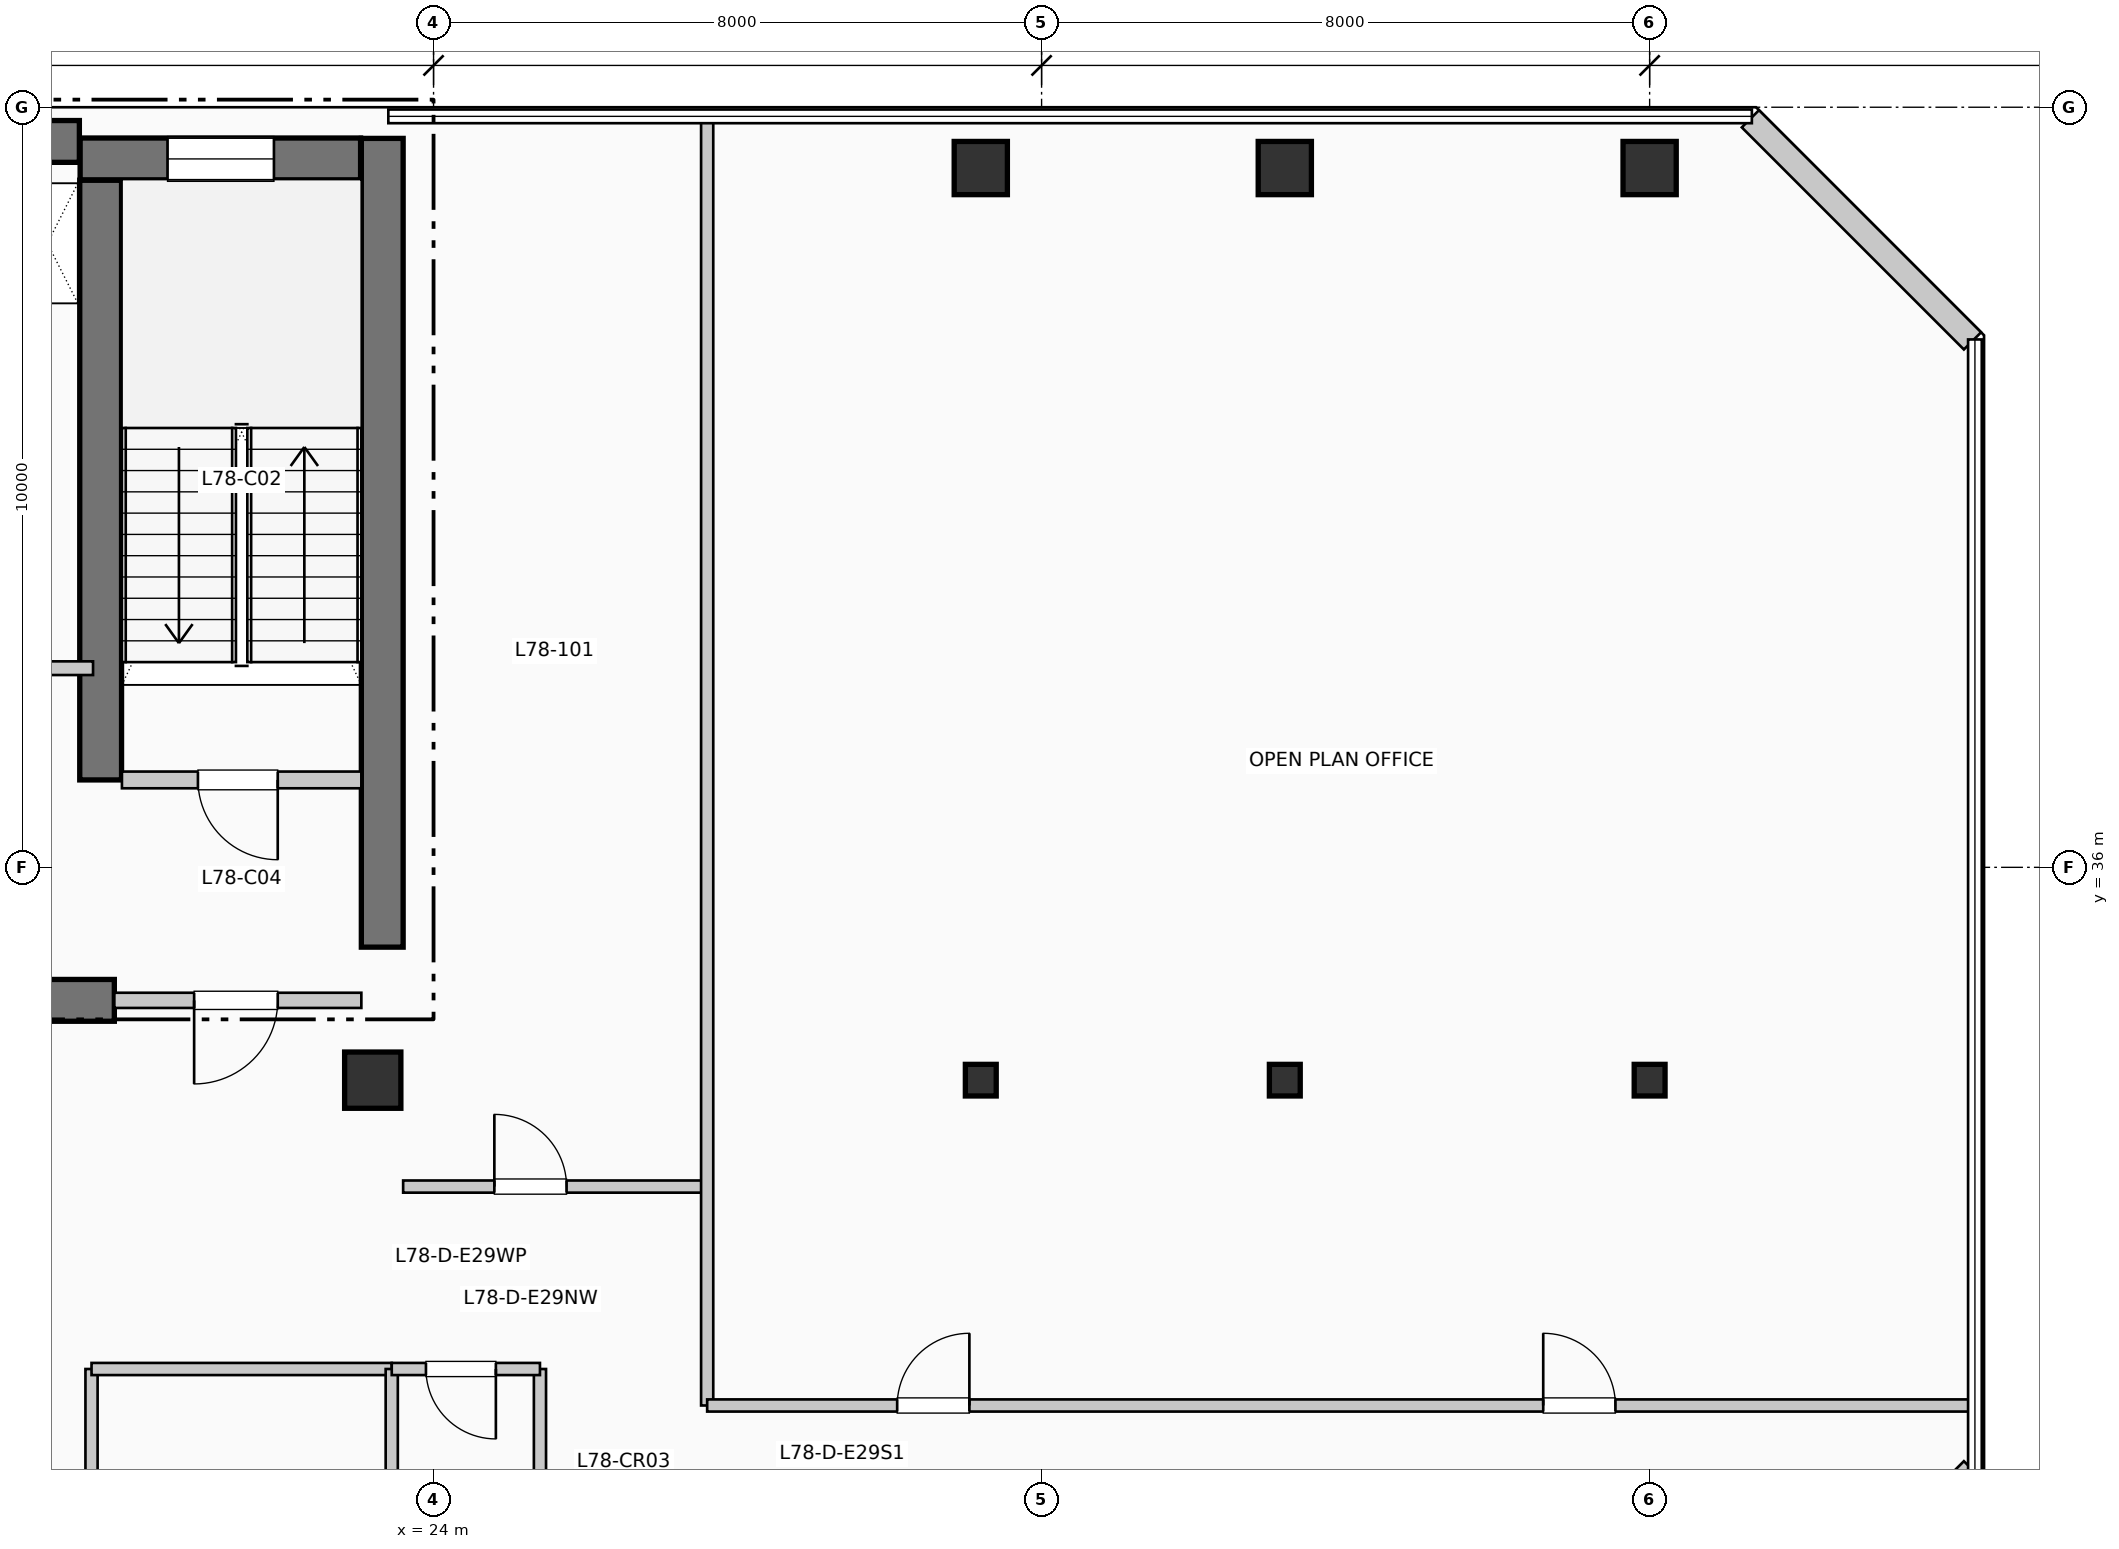
"""IFC4 building model, lengths in metres.
Left out: names, types, materials, properties, quantities, classifications, styles, units other than length and angle.
Written with IfcOpenShell. Run it as: python <this file> out.ifc"""

import sys

from ifc_helpers import new_model, si_unit, direction, frame, frame_2d, origin, origin_2d, place, context, subcontext, project, spatial, rectangle, i_section, extrude, element, fill, save


model = new_model("IFC4")
c1 = context("Model", 3, precision=1e-05, world=origin(), true_north=direction((0.0, 1.0)))
c2 = subcontext(c1, "Body", "Model", "MODEL_VIEW")
j1 = project(units=[si_unit("LENGTHUNIT", "METRE"), si_unit("PLANEANGLEUNIT", "RADIAN")], contexts=[c1])
p1 = place(None, origin())
s1 = spatial("IfcSite", under=j1, at=p1, CompositionType="ELEMENT")
p2 = place(p1, origin())
s2 = spatial("IfcBuilding", under=s1, at=p2, CompositionType="ELEMENT")
p3 = place(p2, frame((0.0, 0.0, 319.77)))
s3 = spatial("IfcBuildingStorey", under=s2, at=p3, CompositionType="ELEMENT", Elevation=319.77)
p4 = place(p3, frame((5.36, 45.55, 0.0), z_axis=(0.0, 0.0, 1.0), x_axis=(1.0, 0.0, 0.0)))
e1 = element("IfcWall", 1, at=p4, inside=s3, PredefinedType="SHEAR", context=c2, shape_type="SweptSolid", body=[
    extrude(rectangle(XDim=13.98, YDim=0.55, at=frame_2d((6.99, 0.0))), origin(), (0.0, 0.0, 1.0), 3.96),
])
p5 = place(p3, frame((23.325, 34.95, 0.0), z_axis=(0.0, 0.0, 1.0), x_axis=(0.0, 1.0, 0.0)))
e2 = element("IfcWall", 2, at=p5, inside=s3, PredefinedType="SHEAR", context=c2, shape_type="SweptSolid", body=[
    extrude(rectangle(XDim=10.64, YDim=0.55, at=frame_2d((5.32, 0.0))), origin(), (0.0, 0.0, 1.0), 3.96),
])
p6 = place(p3, frame((13.68, 34.25, 0.0), z_axis=(0.0, 0.0, 1.0), x_axis=(1.0, 0.0, 0.0)))
e3 = element("IfcWall", 3, at=p6, inside=s3, PredefinedType="SHEAR", context=c2, shape_type="SweptSolid", body=[
    extrude(rectangle(XDim=6.12, YDim=0.55, at=frame_2d((3.06, 0.0))), origin(), (0.0, 0.0, 1.0), 3.96),
])
p7 = place(p3, frame((19.62, 37.15, 0.0), z_axis=(0.0, 0.0, 1.0), x_axis=(0.0, 1.0, 0.0)))
e4 = element("IfcWall", 4, at=p7, inside=s3, PredefinedType="SHEAR", context=c2, shape_type="SweptSolid", body=[
    extrude(rectangle(XDim=7.89, YDim=0.55, at=frame_2d((3.945, 0.0))), origin(), (0.0, 0.0, 1.0), 3.96),
])
p8 = place(p3, frame((19.35, 45.32, 0.0), z_axis=(0.0, 0.0, 1.0), x_axis=(1.0, 0.0, 0.0)))
e5 = element("IfcWall", 5, at=p8, inside=s3, PredefinedType="SHEAR", context=c2, shape_type="SweptSolid", body=[
    extrude(rectangle(XDim=3.69, YDim=0.55, at=frame_2d((1.845, 0.0))), origin(), (0.0, 0.0, 1.0), 3.96),
])
p9 = place(p8, frame((1.15, 0.0, 1.05)))
e6 = element("IfcOpeningElement", 6, at=p9, cuts=e5, PredefinedType="OPENING", context=c2, shape_type="SweptSolid", body=[
    extrude(rectangle(XDim=1.4, YDim=1.8, at=frame_2d((0.7, 0.9))), frame((0.0, 0.285, 0.0), z_axis=(0.0, -1.0, 0.0), x_axis=(1.0, 0.0, 0.0)), (0.0, 0.0, 1.0), 0.57),
])
p10 = place(p3, frame((23.2, 33.2, 0.0), z_axis=(0.0, 0.0, 1.0), x_axis=(1.0, 0.0, 0.0)))
e7 = element("IfcColumn", 7, at=p10, inside=s3, PredefinedType="COLUMN", context=c2, shape_type="SweptSolid", body=[
    extrude(rectangle(XDim=0.74, YDim=0.74, at=origin_2d()), origin(), (0.0, 0.0, 1.0), 3.96),
])
p11 = place(p3, frame((31.2, 33.2, 0.0), z_axis=(0.0, 0.0, 1.0), x_axis=(1.0, 0.0, 0.0)))
e8 = element("IfcColumn", 8, at=p11, inside=s3, PredefinedType="COLUMN", context=c2, shape_type="SweptSolid", body=[
    extrude(i_section(OverallWidth=0.406, OverallDepth=0.416, WebThickness=0.022, FlangeThickness=0.036, at=origin_2d()), origin(), (0.0, 0.0, 1.0), 3.96),
])
p12 = place(p3, frame((31.2, 45.2, 0.0), z_axis=(0.0, 0.0, 1.0), x_axis=(1.0, 0.0, 0.0)))
e9 = element("IfcColumn", 9, at=p12, inside=s3, PredefinedType="COLUMN", context=c2, shape_type="SweptSolid", body=[
    extrude(rectangle(XDim=0.7, YDim=0.7, at=origin_2d()), origin(), (0.0, 0.0, 1.0), 3.96),
])
p13 = place(p3, frame((35.2, 33.2, 0.0), z_axis=(0.0, 0.0, 1.0), x_axis=(1.0, 0.0, 0.0)))
e10 = element("IfcColumn", 10, at=p13, inside=s3, PredefinedType="COLUMN", context=c2, shape_type="SweptSolid", body=[
    extrude(i_section(OverallWidth=0.406, OverallDepth=0.416, WebThickness=0.022, FlangeThickness=0.036, at=origin_2d()), origin(), (0.0, 0.0, 1.0), 3.96),
])
p14 = place(p3, frame((35.2, 45.2, 0.0), z_axis=(0.0, 0.0, 1.0), x_axis=(1.0, 0.0, 0.0)))
e11 = element("IfcColumn", 11, at=p14, inside=s3, PredefinedType="COLUMN", context=c2, shape_type="SweptSolid", body=[
    extrude(rectangle(XDim=0.7, YDim=0.7, at=origin_2d()), origin(), (0.0, 0.0, 1.0), 3.96),
])
p15 = place(p3, frame((40.0, 33.2, 0.0), z_axis=(0.0, 0.0, 1.0), x_axis=(1.0, 0.0, 0.0)))
e12 = element("IfcColumn", 12, at=p15, inside=s3, PredefinedType="COLUMN", context=c2, shape_type="SweptSolid", body=[
    extrude(i_section(OverallWidth=0.406, OverallDepth=0.416, WebThickness=0.022, FlangeThickness=0.036, at=origin_2d()), origin(), (0.0, 0.0, 1.0), 3.96),
])
p16 = place(p3, frame((40.0, 45.2, 0.0), z_axis=(0.0, 0.0, 1.0), x_axis=(1.0, 0.0, 0.0)))
e13 = element("IfcColumn", 13, at=p16, inside=s3, PredefinedType="COLUMN", context=c2, shape_type="SweptSolid", body=[
    extrude(rectangle(XDim=0.7, YDim=0.7, at=origin_2d()), origin(), (0.0, 0.0, 1.0), 3.96),
])
for number, where, z_axis, x_axis in (
    (14, (41.326, 25.152, 0.0), (0.0, 0.0, 1.0), (0.707, 0.707, 0.0)),
    (15, (44.248, 42.926, 0.0), (0.0, 0.0, 1.0), (-0.707, 0.707, 0.0)),
):
    element("IfcWall", number, at=place(p3, frame(where, z_axis=z_axis, x_axis=x_axis)), inside=s3, PredefinedType="SOLIDWALL", context=c2, shape_type="SweptSolid", body=[
        extrude(rectangle(XDim=4.133, YDim=0.32, at=frame_2d((2.066, 0.0))), origin(), (0.0, 0.0, 1.0), 3.74),
    ])
p17 = place(p3, frame((19.9, 37.15, 0.0), z_axis=(0.0, 0.0, 1.0), x_axis=(1.0, 0.0, 0.0)))
e16 = element("IfcWall", 16, at=p17, inside=s3, PredefinedType="PARTITIONING", context=c2, shape_type="SweptSolid", body=[
    extrude(rectangle(XDim=3.15, YDim=0.22, at=frame_2d((1.575, 0.0))), origin(), (0.0, 0.0, 1.0), 3.74),
])
p18 = place(p17, frame((2.05, 0.0, 0.0), z_axis=(0.0, 0.0, 1.0), x_axis=(-1.0, 0.0, 0.0)))
e17 = element("IfcOpeningElement", 17, at=p18, cuts=e16, PredefinedType="OPENING", context=c2, shape_type="SweptSolid", body=[
    extrude(rectangle(XDim=1.05, YDim=2.15, at=frame_2d((0.525, 1.075))), frame((0.0, 0.12, 0.0), z_axis=(0.0, -1.0, 0.0), x_axis=(1.0, 0.0, 0.0)), (0.0, 0.0, 1.0), 0.24),
])
p19 = place(p3, frame((19.8, 34.25, 0.0), z_axis=(0.0, 0.0, 1.0), x_axis=(1.0, 0.0, 0.0)))
e18 = element("IfcWall", 18, at=p19, inside=s3, PredefinedType="PARTITIONING", context=c2, shape_type="SweptSolid", body=[
    extrude(rectangle(XDim=3.25, YDim=0.2, at=frame_2d((1.625, 0.0))), origin(), (0.0, 0.0, 1.0), 3.74),
])
p20 = place(p19, frame((2.15, 0.0, 0.0), z_axis=(0.0, 0.0, 1.0), x_axis=(-1.0, 0.0, 0.0)))
e19 = element("IfcOpeningElement", 19, at=p20, cuts=e18, PredefinedType="OPENING", context=c2, shape_type="SweptSolid", body=[
    extrude(rectangle(XDim=1.1, YDim=2.15, at=frame_2d((0.55, 1.075))), frame((0.0, 0.11, 0.0), z_axis=(0.0, -1.0, 0.0), x_axis=(1.0, 0.0, 0.0)), (0.0, 0.0, 1.0), 0.22),
])
p21 = place(p3, frame((17.68, 38.62, 0.0), z_axis=(0.0, 0.0, 1.0), x_axis=(1.0, 0.0, 0.0)))
e20 = element("IfcWall", 20, at=p21, inside=s3, PredefinedType="PARTITIONING", context=c2, shape_type="SweptSolid", body=[
    extrude(rectangle(XDim=1.84, YDim=0.18, at=frame_2d((0.92, 0.0))), origin(), (0.0, 0.0, 1.0), 3.74),
])
p22 = place(p21, frame((0.24, 0.0, 0.0)))
e21 = element("IfcOpeningElement", 21, at=p22, cuts=e20, PredefinedType="OPENING", context=c2, shape_type="SweptSolid", body=[
    extrude(rectangle(XDim=0.92, YDim=2.1, at=frame_2d((0.46, 1.05))), frame((0.0, 0.1, 0.0), z_axis=(0.0, -1.0, 0.0), x_axis=(1.0, 0.0, 0.0)), (0.0, 0.0, 1.0), 0.2),
])
p23 = place(p3, frame((19.5, 21.0, 0.0), z_axis=(0.0, 0.0, 1.0), x_axis=(0.0, 1.0, 0.0)))
e22 = element("IfcWall", 22, at=p23, inside=s3, PredefinedType="PARTITIONING", context=c2, shape_type="SweptSolid", body=[
    extrude(rectangle(XDim=8.4, YDim=0.16, at=frame_2d((4.2, 0.0))), origin(), (0.0, 0.0, 1.0), 3.74),
])
p24 = place(p23, frame((3.725, 0.0, 0.0)))
e23 = element("IfcOpeningElement", 23, at=p24, cuts=e22, PredefinedType="OPENING", context=c2, shape_type="SweptSolid", body=[
    extrude(rectangle(XDim=0.95, YDim=2.15, at=frame_2d((0.475, 1.075))), frame((0.0, 0.09, 0.0), z_axis=(0.0, -1.0, 0.0), x_axis=(1.0, 0.0, 0.0)), (0.0, 0.0, 1.0), 0.18),
])
p25 = place(p3, frame((19.5, 29.4, 0.0), z_axis=(0.0, 0.0, 1.0), x_axis=(1.0, 0.0, 0.0)))
e24 = element("IfcWall", 24, at=p25, inside=s3, PredefinedType="PARTITIONING", context=c2, shape_type="SweptSolid", body=[
    extrude(rectangle(XDim=3.95, YDim=0.16, at=frame_2d((1.975, 0.0))), origin(), (0.0, 0.0, 1.0), 3.425),
])
p26 = place(p3, frame((23.45, 5.99, 0.0), z_axis=(0.0, 0.0, 1.0), x_axis=(0.0, 1.0, 0.0)))
e25 = element("IfcWall", 25, at=p26, inside=s3, PredefinedType="PARTITIONING", context=c2, shape_type="SweptSolid", body=[
    extrude(rectangle(XDim=23.41, YDim=0.16, at=frame_2d((11.705, 0.0))), origin(), (0.0, 0.0, 1.0), 3.175),
])
p27 = place(p3, frame((25.4, 25.19, 0.0), z_axis=(0.0, 0.0, 1.0), x_axis=(0.0, 1.0, 0.0)))
e26 = element("IfcWall", 26, at=p27, inside=s3, PredefinedType="PARTITIONING", context=c2, shape_type="SweptSolid", body=[
    extrude(rectangle(XDim=4.21, YDim=0.16, at=frame_2d((2.105, 0.0))), origin(), (0.0, 0.0, 1.0), 3.74),
])
p28 = place(p3, frame((23.6, 31.8, 0.0), z_axis=(0.0, 0.0, 1.0), x_axis=(1.0, 0.0, 0.0)))
e27 = element("IfcWall", 27, at=p28, inside=s3, PredefinedType="PARTITIONING", context=c2, shape_type="SweptSolid", body=[
    extrude(rectangle(XDim=4.0, YDim=0.16, at=frame_2d((2.0, 0.0))), origin(), (0.0, 0.0, 1.0), 3.74),
])
p29 = place(p28, frame((1.2, 0.0, 0.0)))
e28 = element("IfcOpeningElement", 28, at=p29, cuts=e27, PredefinedType="OPENING", context=c2, shape_type="SweptSolid", body=[
    extrude(rectangle(XDim=0.95, YDim=2.15, at=frame_2d((0.475, 1.075))), frame((0.0, 0.09, 0.0), z_axis=(0.0, -1.0, 0.0), x_axis=(1.0, 0.0, 0.0)), (0.0, 0.0, 1.0), 0.18),
])
p30 = place(p3, frame((27.6, 28.92, 0.0), z_axis=(0.0, 0.0, 1.0), x_axis=(0.0, 1.0, 0.0)))
e29 = element("IfcWall", 29, at=p30, inside=s3, PredefinedType="PARTITIONING", context=c2, shape_type="SweptSolid", body=[
    extrude(rectangle(XDim=16.89, YDim=0.16, at=frame_2d((8.445, 0.0))), origin(), (0.0, 0.0, 1.0), 3.74),
])
p31 = place(p3, frame((27.6, 28.92, 0.0), z_axis=(0.0, 0.0, 1.0), x_axis=(1.0, 0.0, 0.0)))
e30 = element("IfcWall", 30, at=p31, inside=s3, PredefinedType="PARTITIONING", context=c2, shape_type="SweptSolid", body=[
    extrude(rectangle(XDim=16.61, YDim=0.16, at=frame_2d((8.305, 0.0))), origin(), (0.0, 0.0, 1.0), 3.74),
])
p32 = place(p31, frame((2.5, 0.0, 0.0)))
e31 = element("IfcOpeningElement", 31, at=p32, cuts=e30, PredefinedType="OPENING", context=c2, shape_type="SweptSolid", body=[
    extrude(rectangle(XDim=0.95, YDim=2.15, at=frame_2d((0.475, 1.075))), frame((0.0, 0.09, 0.0), z_axis=(0.0, -1.0, 0.0), x_axis=(1.0, 0.0, 0.0)), (0.0, 0.0, 1.0), 0.18),
])
p33 = place(p31, frame((11.0, 0.0, 0.0)))
e32 = element("IfcOpeningElement", 32, at=p33, cuts=e30, PredefinedType="OPENING", context=c2, shape_type="SweptSolid", body=[
    extrude(rectangle(XDim=0.95, YDim=2.15, at=frame_2d((0.475, 1.075))), frame((0.0, 0.09, 0.0), z_axis=(0.0, -1.0, 0.0), x_axis=(1.0, 0.0, 0.0)), (0.0, 0.0, 1.0), 0.18),
])
p34 = place(p3, frame((23.45, 29.4, 0.0), z_axis=(0.0, 0.0, 1.0), x_axis=(1.0, 0.0, 0.0)))
e33 = element("IfcWall", 33, at=p34, inside=s3, PredefinedType="PARTITIONING", context=c2, shape_type="SweptSolid", body=[
    extrude(rectangle(XDim=1.95, YDim=0.16, at=frame_2d((0.975, 0.0))), origin(), (0.0, 0.0, 1.0), 3.425),
])
p35 = place(p34, frame((1.37, 0.0, 0.0), z_axis=(0.0, 0.0, 1.0), x_axis=(-1.0, 0.0, 0.0)))
e34 = element("IfcOpeningElement", 34, at=p35, cuts=e33, PredefinedType="OPENING", context=c2, shape_type="SweptSolid", body=[
    extrude(rectangle(XDim=0.92, YDim=2.1, at=frame_2d((0.46, 1.05))), frame((0.0, 0.09, 0.0), z_axis=(0.0, -1.0, 0.0), x_axis=(1.0, 0.0, 0.0)), (0.0, 0.0, 1.0), 0.18),
])
p36 = place(p9, origin())
e35 = element("IfcWindow", 35, at=p36, inside=s3, PartitioningType="SINGLE_PANEL", PredefinedType="WINDOW", context=c2, shape_type="SweptSolid", body=[
    extrude(rectangle(XDim=1.4, YDim=1.8, at=frame_2d((0.7, 0.9))), frame((0.0, 0.03, 0.0), z_axis=(0.0, -1.0, 0.0), x_axis=(1.0, 0.0, 0.0)), (0.0, 0.0, 1.0), 0.06),
])
fill(e6, e35)
p37 = place(p18, origin())
e36 = element("IfcDoor", 36, at=p37, inside=s3, OperationType="SINGLE_SWING_RIGHT", PredefinedType="DOOR", context=c2, shape_type="SweptSolid", body=[
    extrude(rectangle(XDim=1.05, YDim=2.15, at=frame_2d((0.525, 1.075))), frame((0.0, 0.025, 0.0), z_axis=(0.0, -1.0, 0.0), x_axis=(1.0, 0.0, 0.0)), (0.0, 0.0, 1.0), 0.05),
])
fill(e17, e36)
p38 = place(p20, origin())
e37 = element("IfcDoor", 37, at=p38, inside=s3, OperationType="SINGLE_SWING_LEFT", PredefinedType="DOOR", context=c2, shape_type="SweptSolid", body=[
    extrude(rectangle(XDim=1.1, YDim=2.15, at=frame_2d((0.55, 1.075))), frame((0.0, 0.025, 0.0), z_axis=(0.0, -1.0, 0.0), x_axis=(1.0, 0.0, 0.0)), (0.0, 0.0, 1.0), 0.05),
])
fill(e19, e37)
p39 = place(p29, origin())
e38 = element("IfcDoor", 38, at=p39, inside=s3, OperationType="SINGLE_SWING_LEFT", PredefinedType="DOOR", context=c2, shape_type="SweptSolid", body=[
    extrude(rectangle(XDim=0.95, YDim=2.15, at=frame_2d((0.475, 1.075))), frame((0.0, 0.025, 0.0), z_axis=(0.0, -1.0, 0.0), x_axis=(1.0, 0.0, 0.0)), (0.0, 0.0, 1.0), 0.05),
])
fill(e28, e38)
p40 = place(p32, origin())
e39 = element("IfcDoor", 39, at=p40, inside=s3, OperationType="SINGLE_SWING_RIGHT", PredefinedType="DOOR", context=c2, shape_type="SweptSolid", body=[
    extrude(rectangle(XDim=0.95, YDim=2.15, at=frame_2d((0.475, 1.075))), frame((0.0, 0.025, 0.0), z_axis=(0.0, -1.0, 0.0), x_axis=(1.0, 0.0, 0.0)), (0.0, 0.0, 1.0), 0.05),
])
fill(e31, e39)
p41 = place(p33, origin())
e40 = element("IfcDoor", 40, at=p41, inside=s3, OperationType="SINGLE_SWING_LEFT", PredefinedType="DOOR", context=c2, shape_type="SweptSolid", body=[
    extrude(rectangle(XDim=0.95, YDim=2.15, at=frame_2d((0.475, 1.075))), frame((0.0, 0.025, 0.0), z_axis=(0.0, -1.0, 0.0), x_axis=(1.0, 0.0, 0.0)), (0.0, 0.0, 1.0), 0.05),
])
fill(e32, e40)
p42 = place(p35, origin())
e41 = element("IfcDoor", 41, at=p42, inside=s3, OperationType="SINGLE_SWING_RIGHT", PredefinedType="DOOR", context=c2, shape_type="SweptSolid", body=[
    extrude(rectangle(XDim=0.92, YDim=2.1, at=frame_2d((0.46, 1.05))), frame((0.0, 0.025, 0.0), z_axis=(0.0, -1.0, 0.0), x_axis=(1.0, 0.0, 0.0)), (0.0, 0.0, 1.0), 0.05),
])
fill(e34, e41)
save(model, sys.argv[1])
